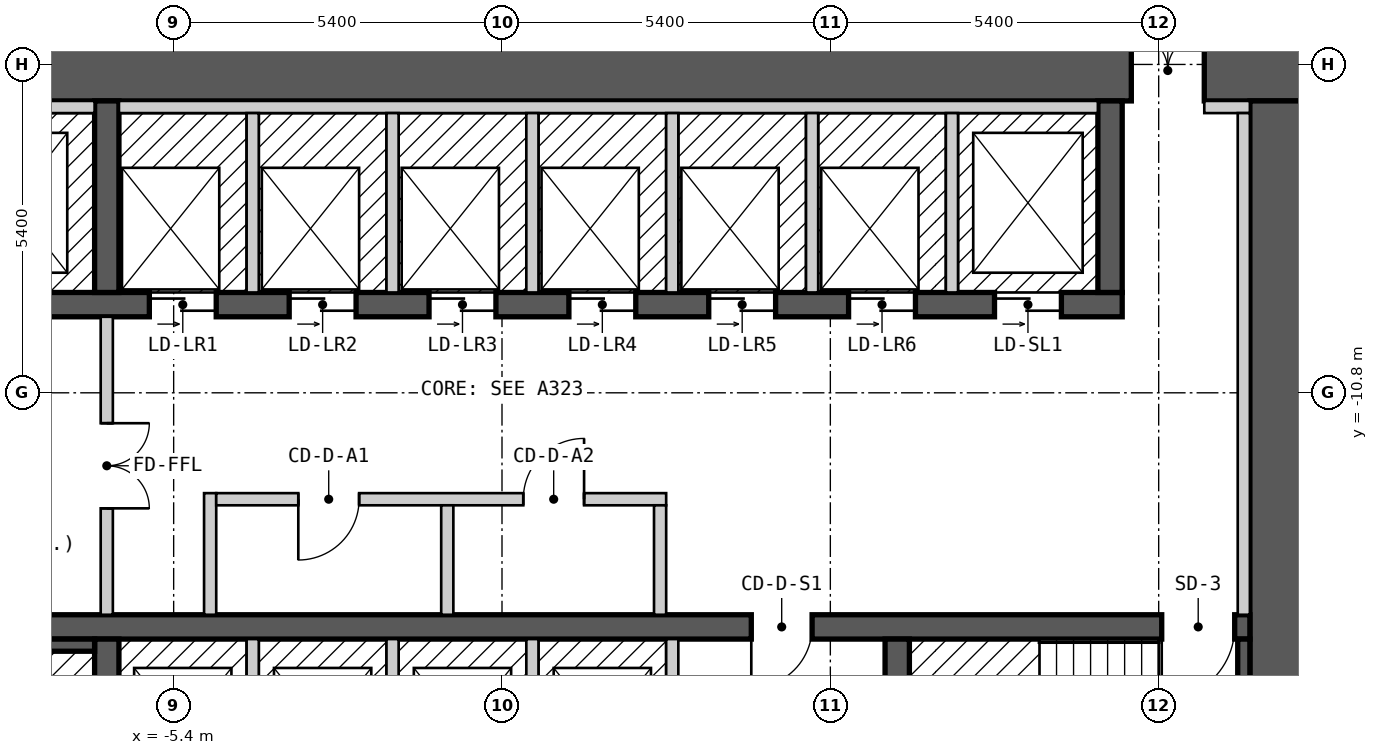
"""IFC4 building model, lengths in metres.
Left out: names, types, materials, properties, quantities, classifications, styles, units other than length and angle.
Written with IfcOpenShell. Run it as: python <this file> out.ifc"""

import sys

from ifc_helpers import new_model, si_unit, direction, frame, frame_2d, origin, place, context, subcontext, project, spatial, rectangle, extrude, element, fill, save


model = new_model("IFC4")
c1 = context("Model", 3, precision=1e-05, world=origin(), true_north=direction((0.0, 1.0)))
c2 = subcontext(c1, "Body", "Model", "MODEL_VIEW")
j1 = project(units=[si_unit("LENGTHUNIT", "METRE"), si_unit("PLANEANGLEUNIT", "RADIAN")], contexts=[c1])
p1 = place(None, origin())
s1 = spatial("IfcSite", under=j1, at=p1, CompositionType="ELEMENT")
p2 = place(p1, origin())
s2 = spatial("IfcBuilding", under=s1, at=p2, CompositionType="ELEMENT")
p3 = place(p2, frame((0.0, 0.0, 75.0)))
s3 = spatial("IfcBuildingStorey", under=s2, at=p3, CompositionType="ELEMENT", Elevation=75.0)
p4 = place(p3, frame((-13.3, -5.5, 0.0), z_axis=(0.0, 0.0, 1.0), x_axis=(1.0, 0.0, 0.0)))
e1 = element("IfcWall", 1, at=p4, inside=s3, PredefinedType="SHEAR", context=c2, shape_type="SweptSolid", body=[
    extrude(rectangle(XDim=26.6, YDim=1.0, at=frame_2d((13.3, 0.0))), origin(), (0.0, 0.0, 1.0), 2.7),
])
p5 = place(p4, frame((23.65, 0.0, 0.0)))
e2 = element("IfcOpeningElement", 2, at=p5, cuts=e1, PredefinedType="OPENING", context=c2, shape_type="SweptSolid", body=[
    extrude(rectangle(XDim=1.2, YDim=2.1, at=frame_2d((0.6, 1.05))), frame((0.0, 0.51, 0.0), z_axis=(0.0, -1.0, 0.0), x_axis=(1.0, 0.0, 0.0)), (0.0, 0.0, 1.0), 1.02),
])
p6 = place(p3, frame((12.8, -18.0, 0.0), z_axis=(0.0, 0.0, 1.0), x_axis=(0.0, 1.0, 0.0)))
e3 = element("IfcWall", 3, at=p6, inside=s3, PredefinedType="SHEAR", context=c2, shape_type="SweptSolid", body=[
    extrude(rectangle(XDim=12.0, YDim=1.0, at=frame_2d((6.0, 0.0))), origin(), (0.0, 0.0, 1.0), 2.7),
])
p7 = place(p3, frame((-12.3, -14.65, 0.0), z_axis=(0.0, 0.0, 1.0), x_axis=(1.0, 0.0, 0.0)))
e4 = element("IfcWall", 4, at=p7, inside=s3, PredefinedType="SHEAR", context=c2, shape_type="SweptSolid", body=[
    extrude(rectangle(XDim=24.6, YDim=0.4, at=frame_2d((12.3, 0.0))), origin(), (0.0, 0.0, 1.0), 2.7),
])
p8 = place(p7, frame((1.5, 0.0, 0.0), z_axis=(0.0, 0.0, 1.0), x_axis=(-1.0, 0.0, 0.0)))
e5 = element("IfcOpeningElement", 5, at=p8, cuts=e4, PredefinedType="OPENING", context=c2, shape_type="SweptSolid", body=[
    extrude(rectangle(XDim=1.2, YDim=2.1, at=frame_2d((0.6, 1.05))), frame((0.0, 0.21, 0.0), z_axis=(0.0, -1.0, 0.0), x_axis=(1.0, 0.0, 0.0)), (0.0, 0.0, 1.0), 0.42),
])
p9 = place(p7, frame((24.35, 0.0, 0.0), z_axis=(0.0, 0.0, 1.0), x_axis=(-1.0, 0.0, 0.0)))
e6 = element("IfcOpeningElement", 6, at=p9, cuts=e4, PredefinedType="OPENING", context=c2, shape_type="SweptSolid", body=[
    extrude(rectangle(XDim=1.2, YDim=2.1, at=frame_2d((0.6, 1.05))), frame((0.0, 0.21, 0.0), z_axis=(0.0, -1.0, 0.0), x_axis=(1.0, 0.0, 0.0)), (0.0, 0.0, 1.0), 0.42),
])
p10 = place(p7, frame((17.4, 0.0, 0.0), z_axis=(0.0, 0.0, 1.0), x_axis=(-1.0, 0.0, 0.0)))
e7 = element("IfcOpeningElement", 7, at=p10, cuts=e4, PredefinedType="OPENING", context=c2, shape_type="SweptSolid", body=[
    extrude(rectangle(XDim=1.0, YDim=2.1, at=frame_2d((0.5, 1.05))), frame((0.0, 0.21, 0.0), z_axis=(0.0, -1.0, 0.0), x_axis=(1.0, 0.0, 0.0)), (0.0, 0.0, 1.0), 0.42),
])
p11 = place(p3, frame((-12.3, -9.35, 0.0), z_axis=(0.0, 0.0, 1.0), x_axis=(1.0, 0.0, 0.0)))
e8 = element("IfcWall", 8, at=p11, inside=s3, PredefinedType="SHEAR", context=c2, shape_type="SweptSolid", body=[
    extrude(rectangle(XDim=22.5, YDim=0.4, at=frame_2d((11.25, 0.0))), origin(), (0.0, 0.0, 1.0), 2.7),
])
p12 = place(p11, frame((0.9, 0.0, 0.0)))
e9 = element("IfcOpeningElement", 9, at=p12, cuts=e8, PredefinedType="OPENING", context=c2, shape_type="SweptSolid", body=[
    extrude(rectangle(XDim=1.1, YDim=2.1, at=frame_2d((0.55, 1.05))), frame((0.0, 0.21, 0.0), z_axis=(0.0, -1.0, 0.0), x_axis=(1.0, 0.0, 0.0)), (0.0, 0.0, 1.0), 0.42),
])
p13 = place(p11, frame((3.7, 0.0, 0.0)))
e10 = element("IfcOpeningElement", 10, at=p13, cuts=e8, PredefinedType="OPENING", context=c2, shape_type="SweptSolid", body=[
    extrude(rectangle(XDim=1.1, YDim=2.1, at=frame_2d((0.55, 1.05))), frame((0.0, 0.21, 0.0), z_axis=(0.0, -1.0, 0.0), x_axis=(1.0, 0.0, 0.0)), (0.0, 0.0, 1.0), 0.42),
])
p14 = place(p11, frame((6.5, 0.0, 0.0)))
e11 = element("IfcOpeningElement", 11, at=p14, cuts=e8, PredefinedType="OPENING", context=c2, shape_type="SweptSolid", body=[
    extrude(rectangle(XDim=1.1, YDim=2.1, at=frame_2d((0.55, 1.05))), frame((0.0, 0.21, 0.0), z_axis=(0.0, -1.0, 0.0), x_axis=(1.0, 0.0, 0.0)), (0.0, 0.0, 1.0), 0.42),
])
p15 = place(p11, frame((8.8, 0.0, 0.0)))
e12 = element("IfcOpeningElement", 12, at=p15, cuts=e8, PredefinedType="OPENING", context=c2, shape_type="SweptSolid", body=[
    extrude(rectangle(XDim=1.1, YDim=2.1, at=frame_2d((0.55, 1.05))), frame((0.0, 0.21, 0.0), z_axis=(0.0, -1.0, 0.0), x_axis=(1.0, 0.0, 0.0)), (0.0, 0.0, 1.0), 0.42),
])
p16 = place(p11, frame((11.1, 0.0, 0.0)))
e13 = element("IfcOpeningElement", 13, at=p16, cuts=e8, PredefinedType="OPENING", context=c2, shape_type="SweptSolid", body=[
    extrude(rectangle(XDim=1.1, YDim=2.1, at=frame_2d((0.55, 1.05))), frame((0.0, 0.21, 0.0), z_axis=(0.0, -1.0, 0.0), x_axis=(1.0, 0.0, 0.0)), (0.0, 0.0, 1.0), 0.42),
])
p17 = place(p11, frame((13.4, 0.0, 0.0)))
e14 = element("IfcOpeningElement", 14, at=p17, cuts=e8, PredefinedType="OPENING", context=c2, shape_type="SweptSolid", body=[
    extrude(rectangle(XDim=1.1, YDim=2.1, at=frame_2d((0.55, 1.05))), frame((0.0, 0.21, 0.0), z_axis=(0.0, -1.0, 0.0), x_axis=(1.0, 0.0, 0.0)), (0.0, 0.0, 1.0), 0.42),
])
p18 = place(p11, frame((15.7, 0.0, 0.0)))
e15 = element("IfcOpeningElement", 15, at=p18, cuts=e8, PredefinedType="OPENING", context=c2, shape_type="SweptSolid", body=[
    extrude(rectangle(XDim=1.1, YDim=2.1, at=frame_2d((0.55, 1.05))), frame((0.0, 0.21, 0.0), z_axis=(0.0, -1.0, 0.0), x_axis=(1.0, 0.0, 0.0)), (0.0, 0.0, 1.0), 0.42),
])
p19 = place(p11, frame((18.0, 0.0, 0.0)))
e16 = element("IfcOpeningElement", 16, at=p19, cuts=e8, PredefinedType="OPENING", context=c2, shape_type="SweptSolid", body=[
    extrude(rectangle(XDim=1.1, YDim=2.1, at=frame_2d((0.55, 1.05))), frame((0.0, 0.21, 0.0), z_axis=(0.0, -1.0, 0.0), x_axis=(1.0, 0.0, 0.0)), (0.0, 0.0, 1.0), 0.42),
])
p20 = place(p11, frame((20.4, 0.0, 0.0)))
e17 = element("IfcOpeningElement", 17, at=p20, cuts=e8, PredefinedType="OPENING", context=c2, shape_type="SweptSolid", body=[
    extrude(rectangle(XDim=1.1, YDim=2.1, at=frame_2d((0.55, 1.05))), frame((0.0, 0.21, 0.0), z_axis=(0.0, -1.0, 0.0), x_axis=(1.0, 0.0, 0.0)), (0.0, 0.0, 1.0), 0.42),
])
for number, where, z_axis, x_axis in (
    (18, (-6.5, -18.0, 0.0), (0.0, 0.0, 1.0), (0.0, 1.0, 0.0)),
    (19, (6.5, -18.0, 0.0), (0.0, 0.0, 1.0), (0.0, 1.0, 0.0)),
    (20, (-6.5, -9.15, 0.0), (0.0, 0.0, 1.0), (0.0, 1.0, 0.0)),
    (21, (10.0, -9.15, 0.0), (0.0, 0.0, 1.0), (0.0, 1.0, 0.0)),
):
    element("IfcWall", number, at=place(p3, frame(where, z_axis=z_axis, x_axis=x_axis)), inside=s3, PredefinedType="SHEAR", context=c2, shape_type="SweptSolid", body=[
        extrude(rectangle(XDim=3.15, YDim=0.4, at=frame_2d((1.575, 0.0))), origin(), (0.0, 0.0, 1.0), 2.7),
    ])
p21 = place(p3, frame((-12.1, -6.1, 0.0), z_axis=(0.0, 0.0, 1.0), x_axis=(1.0, 0.0, 0.0)))
e22 = element("IfcWall", 22, at=p21, inside=s3, PredefinedType="SOLIDWALL", context=c2, shape_type="SweptSolid", body=[
    extrude(rectangle(XDim=5.4, YDim=0.2, at=frame_2d((2.7, 0.0))), origin(), (0.0, 0.0, 1.0), 2.7),
])
p22 = place(p3, frame((-10.8, -14.95, 0.0), z_axis=(0.0, 0.0, 1.0), x_axis=(1.0, 0.0, 0.0)))
e23 = element("IfcWall", 23, at=p22, inside=s3, PredefinedType="SOLIDWALL", context=c2, shape_type="SweptSolid", body=[
    extrude(rectangle(XDim=4.1, YDim=0.2, at=frame_2d((2.05, 0.0))), origin(), (0.0, 0.0, 1.0), 2.7),
])
p23 = place(p3, frame((-6.5, -14.45, 0.0), z_axis=(0.0, 0.0, 1.0), x_axis=(0.0, 1.0, 0.0)))
e24 = element("IfcWall", 24, at=p23, inside=s3, PredefinedType="PARTITIONING", context=c2, shape_type="SweptSolid", body=[
    extrude(rectangle(XDim=4.9, YDim=0.2, at=frame_2d((2.45, 0.0))), origin(), (0.0, 0.0, 1.0), 2.7),
])
p24 = place(p23, frame((3.15, 0.0, 0.0), z_axis=(0.0, 0.0, 1.0), x_axis=(-1.0, 0.0, 0.0)))
e25 = element("IfcOpeningElement", 25, at=p24, cuts=e24, PredefinedType="OPENING", context=c2, shape_type="SweptSolid", body=[
    extrude(rectangle(XDim=1.4, YDim=2.1, at=frame_2d((0.7, 1.05))), frame((0.0, 0.11, 0.0), z_axis=(0.0, -1.0, 0.0), x_axis=(1.0, 0.0, 0.0)), (0.0, 0.0, 1.0), 0.22),
])
p25 = place(p3, frame((-6.3, -6.1, 0.0), z_axis=(0.0, 0.0, 1.0), x_axis=(1.0, 0.0, 0.0)))
e26 = element("IfcWall", 26, at=p25, inside=s3, PredefinedType="SOLIDWALL", context=c2, shape_type="SweptSolid", body=[
    extrude(rectangle(XDim=16.1, YDim=0.2, at=frame_2d((8.05, 0.0))), origin(), (0.0, 0.0, 1.0), 2.7),
])
p26 = place(p3, frame((-4.8, -14.45, 0.0), z_axis=(0.0, 0.0, 1.0), x_axis=(0.0, 1.0, 0.0)))
e27 = element("IfcWall", 27, at=p26, inside=s3, PredefinedType="PARTITIONING", context=c2, shape_type="SweptSolid", body=[
    extrude(rectangle(XDim=2.0, YDim=0.2, at=frame_2d((1.0, 0.0))), origin(), (0.0, 0.0, 1.0), 2.7),
])
p27 = place(p3, frame((-4.7, -12.55, 0.0), z_axis=(0.0, 0.0, 1.0), x_axis=(1.0, 0.0, 0.0)))
e28 = element("IfcWall", 28, at=p27, inside=s3, PredefinedType="PARTITIONING", context=c2, shape_type="SweptSolid", body=[
    extrude(rectangle(XDim=7.4, YDim=0.2, at=frame_2d((3.7, 0.0))), origin(), (0.0, 0.0, 1.0), 2.7),
])
p28 = place(p27, frame((2.35, 0.0, 0.0), z_axis=(0.0, 0.0, 1.0), x_axis=(-1.0, 0.0, 0.0)))
e29 = element("IfcOpeningElement", 29, at=p28, cuts=e28, PredefinedType="OPENING", context=c2, shape_type="SweptSolid", body=[
    extrude(rectangle(XDim=1.0, YDim=2.1, at=frame_2d((0.5, 1.05))), frame((0.0, 0.11, 0.0), z_axis=(0.0, -1.0, 0.0), x_axis=(1.0, 0.0, 0.0)), (0.0, 0.0, 1.0), 0.22),
])
p29 = place(p27, frame((6.05, 0.0, 0.0), z_axis=(0.0, 0.0, 1.0), x_axis=(-1.0, 0.0, 0.0)))
e30 = element("IfcOpeningElement", 30, at=p29, cuts=e28, PredefinedType="OPENING", context=c2, shape_type="SweptSolid", body=[
    extrude(rectangle(XDim=1.0, YDim=2.1, at=frame_2d((0.5, 1.05))), frame((0.0, 0.11, 0.0), z_axis=(0.0, -1.0, 0.0), x_axis=(1.0, 0.0, 0.0)), (0.0, 0.0, 1.0), 0.22),
])
for number, where, z_axis, x_axis in (
    (31, (-4.1, -17.8, 0.0), (0.0, 0.0, 1.0), (0.0, 1.0, 0.0)),
    (32, (-4.1, -9.15, 0.0), (0.0, 0.0, 1.0), (0.0, 1.0, 0.0)),
    (33, (-1.8, -17.8, 0.0), (0.0, 0.0, 1.0), (0.0, 1.0, 0.0)),
    (34, (-1.8, -9.15, 0.0), (0.0, 0.0, 1.0), (0.0, 1.0, 0.0)),
):
    element("IfcWall", number, at=place(p3, frame(where, z_axis=z_axis, x_axis=x_axis)), inside=s3, PredefinedType="SOLIDWALL", context=c2, shape_type="SweptSolid", body=[
        extrude(rectangle(XDim=2.95, YDim=0.2, at=frame_2d((1.475, 0.0))), origin(), (0.0, 0.0, 1.0), 2.7),
    ])
p30 = place(p3, frame((-0.9, -14.45, 0.0), z_axis=(0.0, 0.0, 1.0), x_axis=(0.0, 1.0, 0.0)))
e35 = element("IfcWall", 35, at=p30, inside=s3, PredefinedType="PARTITIONING", context=c2, shape_type="SweptSolid", body=[
    extrude(rectangle(XDim=1.8, YDim=0.2, at=frame_2d((0.9, 0.0))), origin(), (0.0, 0.0, 1.0), 2.7),
])
for number, where, z_axis, x_axis in (
    (36, (0.5, -17.8, 0.0), (0.0, 0.0, 1.0), (0.0, 1.0, 0.0)),
    (37, (0.5, -9.15, 0.0), (0.0, 0.0, 1.0), (0.0, 1.0, 0.0)),
):
    element("IfcWall", number, at=place(p3, frame(where, z_axis=z_axis, x_axis=x_axis)), inside=s3, PredefinedType="SOLIDWALL", context=c2, shape_type="SweptSolid", body=[
        extrude(rectangle(XDim=2.95, YDim=0.2, at=frame_2d((1.475, 0.0))), origin(), (0.0, 0.0, 1.0), 2.7),
    ])
p31 = place(p3, frame((2.6, -14.45, 0.0), z_axis=(0.0, 0.0, 1.0), x_axis=(0.0, 1.0, 0.0)))
e38 = element("IfcWall", 38, at=p31, inside=s3, PredefinedType="PARTITIONING", context=c2, shape_type="SweptSolid", body=[
    extrude(rectangle(XDim=1.8, YDim=0.2, at=frame_2d((0.9, 0.0))), origin(), (0.0, 0.0, 1.0), 2.7),
])
for number, where, z_axis, x_axis in (
    (39, (2.8, -17.8, 0.0), (0.0, 0.0, 1.0), (0.0, 1.0, 0.0)),
    (40, (2.8, -9.15, 0.0), (0.0, 0.0, 1.0), (0.0, 1.0, 0.0)),
    (41, (5.1, -9.15, 0.0), (0.0, 0.0, 1.0), (0.0, 1.0, 0.0)),
    (42, (7.4, -9.15, 0.0), (0.0, 0.0, 1.0), (0.0, 1.0, 0.0)),
):
    element("IfcWall", number, at=place(p3, frame(where, z_axis=z_axis, x_axis=x_axis)), inside=s3, PredefinedType="SOLIDWALL", context=c2, shape_type="SweptSolid", body=[
        extrude(rectangle(XDim=2.95, YDim=0.2, at=frame_2d((1.475, 0.0))), origin(), (0.0, 0.0, 1.0), 2.7),
    ])
p32 = place(p3, frame((11.55, -6.1, 0.0), z_axis=(0.0, 0.0, 1.0), x_axis=(1.0, 0.0, 0.0)))
e43 = element("IfcWall", 43, at=p32, inside=s3, PredefinedType="PARTITIONING", context=c2, shape_type="SweptSolid", body=[
    extrude(rectangle(XDim=0.75, YDim=0.2, at=frame_2d((0.375, 0.0))), origin(), (0.0, 0.0, 1.0), 2.7),
])
p33 = place(p3, frame((12.2, -17.6, 0.0), z_axis=(0.0, 0.0, 1.0), x_axis=(0.0, 1.0, 0.0)))
e44 = element("IfcWall", 44, at=p33, inside=s3, PredefinedType="SOLIDWALL", context=c2, shape_type="SweptSolid", body=[
    extrude(rectangle(XDim=2.75, YDim=0.2, at=frame_2d((1.375, 0.0))), origin(), (0.0, 0.0, 1.0), 2.7),
])
p34 = place(p3, frame((12.2, -14.45, 0.0), z_axis=(0.0, 0.0, 1.0), x_axis=(0.0, 1.0, 0.0)))
e45 = element("IfcWall", 45, at=p34, inside=s3, PredefinedType="PARTITIONING", context=c2, shape_type="SweptSolid", body=[
    extrude(rectangle(XDim=8.25, YDim=0.2, at=frame_2d((4.125, 0.0))), origin(), (0.0, 0.0, 1.0), 2.7),
])
p35 = place(p14, origin())
e46 = element("IfcDoor", 46, at=p35, inside=s3, OperationType="DOUBLE_DOOR_SLIDING", PredefinedType="DOOR", context=c2, shape_type="SweptSolid", body=[
    extrude(rectangle(XDim=1.1, YDim=2.1, at=frame_2d((0.55, 1.05))), frame((0.0, 0.025, 0.0), z_axis=(0.0, -1.0, 0.0), x_axis=(1.0, 0.0, 0.0)), (0.0, 0.0, 1.0), 0.05),
])
fill(e11, e46)
p36 = place(p15, origin())
e47 = element("IfcDoor", 47, at=p36, inside=s3, OperationType="DOUBLE_DOOR_SLIDING", PredefinedType="DOOR", context=c2, shape_type="SweptSolid", body=[
    extrude(rectangle(XDim=1.1, YDim=2.1, at=frame_2d((0.55, 1.05))), frame((0.0, 0.025, 0.0), z_axis=(0.0, -1.0, 0.0), x_axis=(1.0, 0.0, 0.0)), (0.0, 0.0, 1.0), 0.05),
])
fill(e12, e47)
p37 = place(p16, origin())
e48 = element("IfcDoor", 48, at=p37, inside=s3, OperationType="DOUBLE_DOOR_SLIDING", PredefinedType="DOOR", context=c2, shape_type="SweptSolid", body=[
    extrude(rectangle(XDim=1.1, YDim=2.1, at=frame_2d((0.55, 1.05))), frame((0.0, 0.025, 0.0), z_axis=(0.0, -1.0, 0.0), x_axis=(1.0, 0.0, 0.0)), (0.0, 0.0, 1.0), 0.05),
])
fill(e13, e48)
p38 = place(p17, origin())
e49 = element("IfcDoor", 49, at=p38, inside=s3, OperationType="DOUBLE_DOOR_SLIDING", PredefinedType="DOOR", context=c2, shape_type="SweptSolid", body=[
    extrude(rectangle(XDim=1.1, YDim=2.1, at=frame_2d((0.55, 1.05))), frame((0.0, 0.025, 0.0), z_axis=(0.0, -1.0, 0.0), x_axis=(1.0, 0.0, 0.0)), (0.0, 0.0, 1.0), 0.05),
])
fill(e14, e49)
p39 = place(p18, origin())
e50 = element("IfcDoor", 50, at=p39, inside=s3, OperationType="DOUBLE_DOOR_SLIDING", PredefinedType="DOOR", context=c2, shape_type="SweptSolid", body=[
    extrude(rectangle(XDim=1.1, YDim=2.1, at=frame_2d((0.55, 1.05))), frame((0.0, 0.025, 0.0), z_axis=(0.0, -1.0, 0.0), x_axis=(1.0, 0.0, 0.0)), (0.0, 0.0, 1.0), 0.05),
])
fill(e15, e50)
p40 = place(p19, origin())
e51 = element("IfcDoor", 51, at=p40, inside=s3, OperationType="DOUBLE_DOOR_SLIDING", PredefinedType="DOOR", context=c2, shape_type="SweptSolid", body=[
    extrude(rectangle(XDim=1.1, YDim=2.1, at=frame_2d((0.55, 1.05))), frame((0.0, 0.025, 0.0), z_axis=(0.0, -1.0, 0.0), x_axis=(1.0, 0.0, 0.0)), (0.0, 0.0, 1.0), 0.05),
])
fill(e16, e51)
p41 = place(p20, origin())
e52 = element("IfcDoor", 52, at=p41, inside=s3, OperationType="DOUBLE_DOOR_SLIDING", PredefinedType="DOOR", context=c2, shape_type="SweptSolid", body=[
    extrude(rectangle(XDim=1.1, YDim=2.1, at=frame_2d((0.55, 1.05))), frame((0.0, 0.025, 0.0), z_axis=(0.0, -1.0, 0.0), x_axis=(1.0, 0.0, 0.0)), (0.0, 0.0, 1.0), 0.05),
])
fill(e17, e52)
p42 = place(p9, origin())
e53 = element("IfcDoor", 53, at=p42, inside=s3, OperationType="SINGLE_SWING_RIGHT", PredefinedType="DOOR", context=c2, shape_type="SweptSolid", body=[
    extrude(rectangle(XDim=1.2, YDim=2.1, at=frame_2d((0.6, 1.05))), frame((0.0, 0.025, 0.0), z_axis=(0.0, -1.0, 0.0), x_axis=(1.0, 0.0, 0.0)), (0.0, 0.0, 1.0), 0.05),
])
fill(e6, e53)
p43 = place(p24, origin())
e54 = element("IfcDoor", 54, at=p43, inside=s3, OperationType="DOUBLE_DOOR_SINGLE_SWING", PredefinedType="DOOR", context=c2, shape_type="SweptSolid", body=[
    extrude(rectangle(XDim=1.4, YDim=2.1, at=frame_2d((0.7, 1.05))), frame((0.0, 0.025, 0.0), z_axis=(0.0, -1.0, 0.0), x_axis=(1.0, 0.0, 0.0)), (0.0, 0.0, 1.0), 0.05),
])
fill(e25, e54)
p44 = place(p5, origin())
e55 = element("IfcDoor", 55, at=p44, inside=s3, OperationType="DOUBLE_DOOR_SINGLE_SWING", PredefinedType="DOOR", context=c2, shape_type="SweptSolid", body=[
    extrude(rectangle(XDim=1.2, YDim=2.1, at=frame_2d((0.6, 1.05))), frame((0.0, 0.025, 0.0), z_axis=(0.0, -1.0, 0.0), x_axis=(1.0, 0.0, 0.0)), (0.0, 0.0, 1.0), 0.05),
])
fill(e2, e55)
p45 = place(p28, origin())
e56 = element("IfcDoor", 56, at=p45, inside=s3, OperationType="SINGLE_SWING_RIGHT", PredefinedType="DOOR", context=c2, shape_type="SweptSolid", body=[
    extrude(rectangle(XDim=1.0, YDim=2.1, at=frame_2d((0.5, 1.05))), frame((0.0, 0.025, 0.0), z_axis=(0.0, -1.0, 0.0), x_axis=(1.0, 0.0, 0.0)), (0.0, 0.0, 1.0), 0.05),
])
fill(e29, e56)
p46 = place(p29, origin())
e57 = element("IfcDoor", 57, at=p46, inside=s3, OperationType="SINGLE_SWING_LEFT", PredefinedType="DOOR", context=c2, shape_type="SweptSolid", body=[
    extrude(rectangle(XDim=1.0, YDim=2.1, at=frame_2d((0.5, 1.05))), frame((0.0, 0.025, 0.0), z_axis=(0.0, -1.0, 0.0), x_axis=(1.0, 0.0, 0.0)), (0.0, 0.0, 1.0), 0.05),
])
fill(e30, e57)
p47 = place(p10, origin())
e58 = element("IfcDoor", 58, at=p47, inside=s3, OperationType="SINGLE_SWING_RIGHT", PredefinedType="DOOR", context=c2, shape_type="SweptSolid", body=[
    extrude(rectangle(XDim=1.0, YDim=2.1, at=frame_2d((0.5, 1.05))), frame((0.0, 0.025, 0.0), z_axis=(0.0, -1.0, 0.0), x_axis=(1.0, 0.0, 0.0)), (0.0, 0.0, 1.0), 0.05),
])
fill(e7, e58)
save(model, sys.argv[1])
